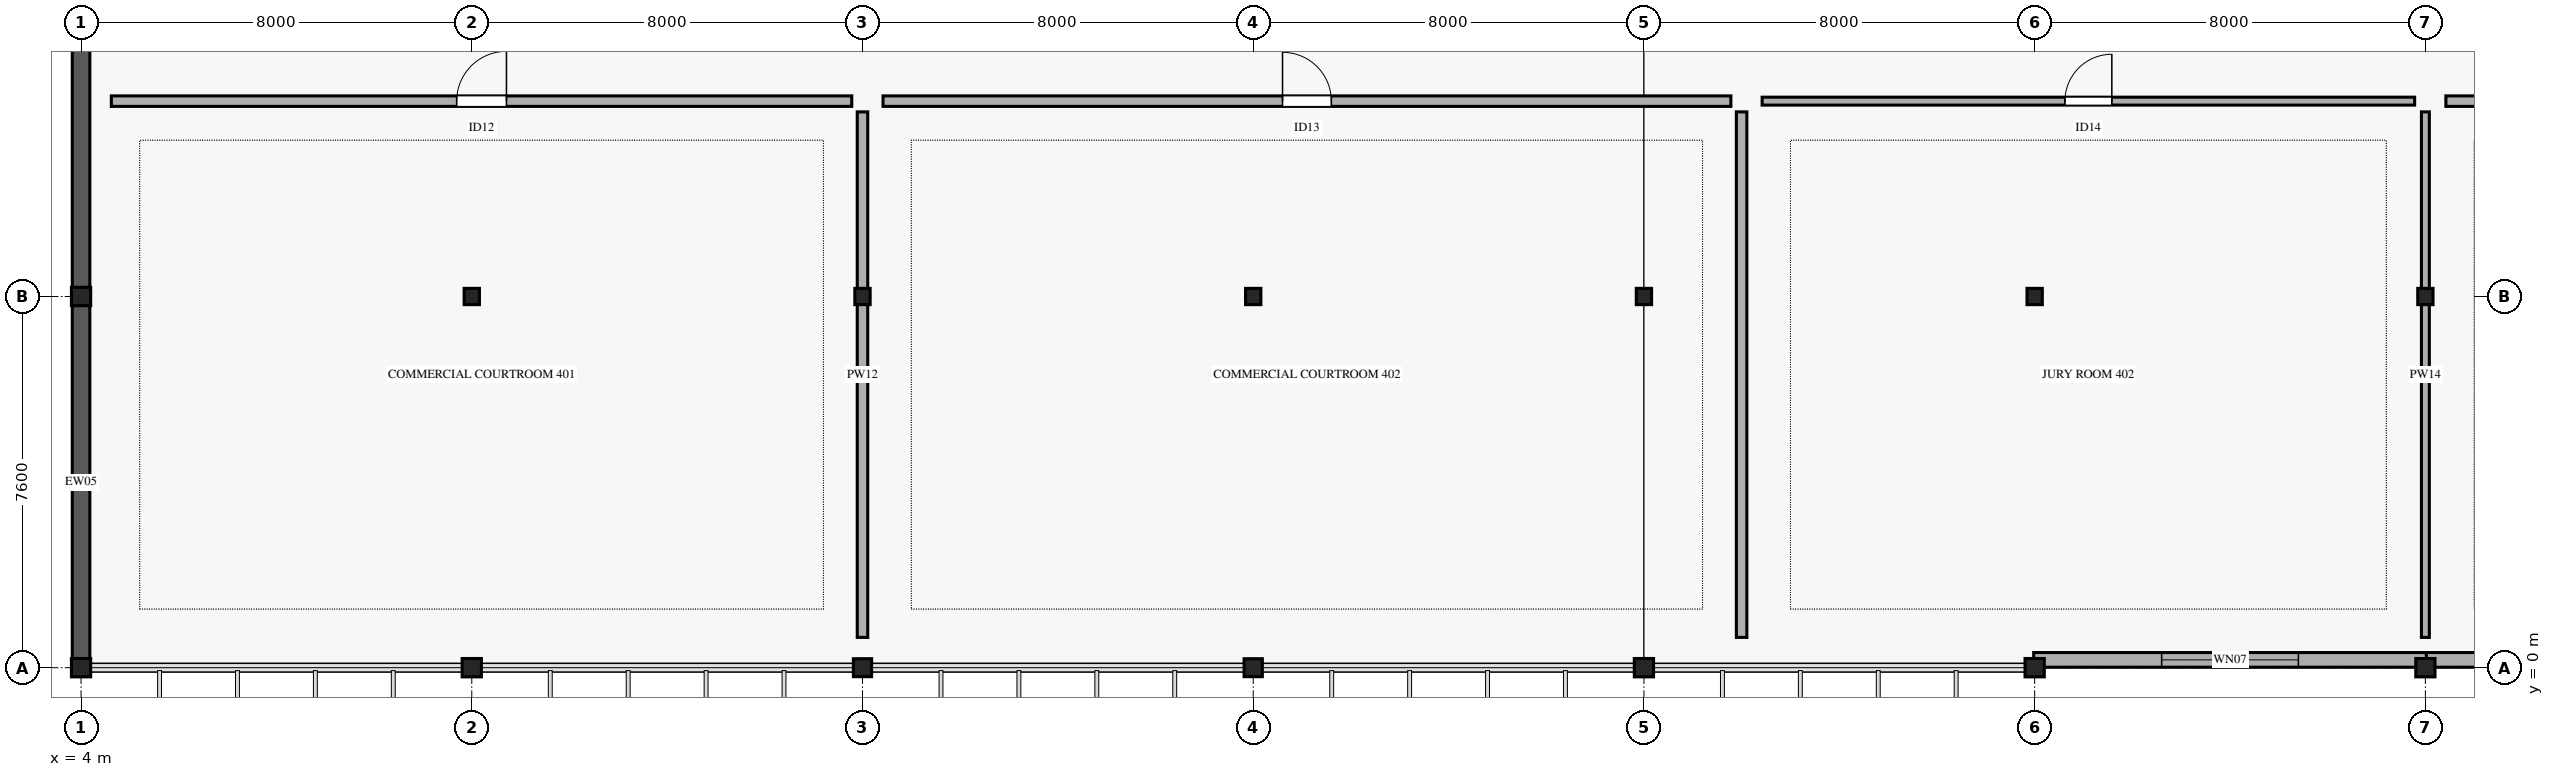
"""IFC4 building model, lengths in metres.
Left out: names, types, materials, properties, quantities, classifications, styles, units other than length and angle.
Written with IfcOpenShell. Run it as: python <this file> out.ifc"""

import sys

from ifc_helpers import new_model, si_unit, direction, frame, frame_2d, origin, origin_2d, place, context, subcontext, project, spatial, rectangle, i_section, extrude, element, fill, save


model = new_model("IFC4")
c1 = context("Model", 3, precision=1e-05, world=origin(), true_north=direction((0.0, 1.0)))
c2 = subcontext(c1, "Body", "Model", "MODEL_VIEW")
j1 = project(units=[si_unit("LENGTHUNIT", "METRE"), si_unit("PLANEANGLEUNIT", "RADIAN")], contexts=[c1])
p1 = place(None, origin())
s1 = spatial("IfcSite", under=j1, at=p1, CompositionType="ELEMENT")
p2 = place(p1, origin())
s2 = spatial("IfcBuilding", under=s1, at=p2, CompositionType="ELEMENT")
p3 = place(p2, frame((0.0, 0.0, 20.4)))
s3 = spatial("IfcBuildingStorey", under=s2, at=p3, CompositionType="ELEMENT", Elevation=20.4)
for number, where, z_axis, x_axis in (
    (1, (4.0, 0.0, 0.0), (0.0, 0.0, 1.0), (1.0, 0.0, 0.0)),
    (2, (4.0, 7.6, 0.0), (0.0, 0.0, 1.0), (1.0, 0.0, 0.0)),
    (3, (12.0, 0.0, 0.0), (0.0, 0.0, 1.0), (1.0, 0.0, 0.0)),
):
    element("IfcColumn", number, at=place(p3, frame(where, z_axis=z_axis, x_axis=x_axis)), inside=s3, PredefinedType="COLUMN", context=c2, shape_type="SweptSolid", body=[
        extrude(i_section(OverallWidth=0.394, OverallDepth=0.376, WebThickness=0.017, FlangeThickness=0.028, FilletRadius=0.015, at=origin_2d()), origin(), (0.0, 0.0, 1.0), 4.595),
    ])
p4 = place(p3, frame((12.0, 7.6, 0.0), z_axis=(0.0, 0.0, 1.0), x_axis=(1.0, 0.0, 0.0)))
e4 = element("IfcColumn", 4, at=p4, inside=s3, PredefinedType="COLUMN", context=c2, shape_type="SweptSolid", body=[
    extrude(i_section(OverallWidth=0.313, OverallDepth=0.333, WebThickness=0.018, FlangeThickness=0.028, FilletRadius=0.015, at=origin_2d()), origin(), (0.0, 0.0, 1.0), 4.595),
])
p5 = place(p3, frame((20.0, 0.0, 0.0), z_axis=(0.0, 0.0, 1.0), x_axis=(1.0, 0.0, 0.0)))
e5 = element("IfcColumn", 5, at=p5, inside=s3, PredefinedType="COLUMN", context=c2, shape_type="SweptSolid", body=[
    extrude(i_section(OverallWidth=0.373, OverallDepth=0.368, WebThickness=0.015, FlangeThickness=0.024, FilletRadius=0.015, at=origin_2d()), origin(), (0.0, 0.0, 1.0), 4.595),
])
p6 = place(p3, frame((20.0, 7.6, 0.0), z_axis=(0.0, 0.0, 1.0), x_axis=(1.0, 0.0, 0.0)))
e6 = element("IfcColumn", 6, at=p6, inside=s3, PredefinedType="COLUMN", context=c2, shape_type="SweptSolid", body=[
    extrude(i_section(OverallWidth=0.313, OverallDepth=0.333, WebThickness=0.018, FlangeThickness=0.028, FilletRadius=0.015, at=origin_2d()), origin(), (0.0, 0.0, 1.0), 4.595),
])
p7 = place(p3, frame((28.0, 0.0, 0.0), z_axis=(0.0, 0.0, 1.0), x_axis=(1.0, 0.0, 0.0)))
e7 = element("IfcColumn", 7, at=p7, inside=s3, PredefinedType="COLUMN", context=c2, shape_type="SweptSolid", body=[
    extrude(i_section(OverallWidth=0.373, OverallDepth=0.368, WebThickness=0.015, FlangeThickness=0.024, FilletRadius=0.015, at=origin_2d()), origin(), (0.0, 0.0, 1.0), 4.595),
])
p8 = place(p3, frame((28.0, 7.6, 0.0), z_axis=(0.0, 0.0, 1.0), x_axis=(1.0, 0.0, 0.0)))
e8 = element("IfcColumn", 8, at=p8, inside=s3, PredefinedType="COLUMN", context=c2, shape_type="SweptSolid", body=[
    extrude(i_section(OverallWidth=0.313, OverallDepth=0.333, WebThickness=0.018, FlangeThickness=0.028, FilletRadius=0.015, at=origin_2d()), origin(), (0.0, 0.0, 1.0), 4.595),
])
p9 = place(p3, frame((36.0, 0.0, 0.0), z_axis=(0.0, 0.0, 1.0), x_axis=(1.0, 0.0, 0.0)))
e9 = element("IfcColumn", 9, at=p9, inside=s3, PredefinedType="COLUMN", context=c2, shape_type="SweptSolid", body=[
    extrude(i_section(OverallWidth=0.394, OverallDepth=0.376, WebThickness=0.017, FlangeThickness=0.028, FilletRadius=0.015, at=origin_2d()), origin(), (0.0, 0.0, 1.0), 4.595),
])
p10 = place(p3, frame((36.0, 7.6, 0.0), z_axis=(0.0, 0.0, 1.0), x_axis=(1.0, 0.0, 0.0)))
e10 = element("IfcColumn", 10, at=p10, inside=s3, PredefinedType="COLUMN", context=c2, shape_type="SweptSolid", body=[
    extrude(i_section(OverallWidth=0.313, OverallDepth=0.333, WebThickness=0.018, FlangeThickness=0.028, FilletRadius=0.015, at=origin_2d()), origin(), (0.0, 0.0, 1.0), 4.595),
])
p11 = place(p3, frame((44.0, 0.0, 0.0), z_axis=(0.0, 0.0, 1.0), x_axis=(1.0, 0.0, 0.0)))
e11 = element("IfcColumn", 11, at=p11, inside=s3, PredefinedType="COLUMN", context=c2, shape_type="SweptSolid", body=[
    extrude(i_section(OverallWidth=0.394, OverallDepth=0.376, WebThickness=0.017, FlangeThickness=0.028, FilletRadius=0.015, at=origin_2d()), origin(), (0.0, 0.0, 1.0), 4.595),
])
p12 = place(p3, frame((44.0, 7.6, 0.0), z_axis=(0.0, 0.0, 1.0), x_axis=(1.0, 0.0, 0.0)))
e12 = element("IfcColumn", 12, at=p12, inside=s3, PredefinedType="COLUMN", context=c2, shape_type="SweptSolid", body=[
    extrude(i_section(OverallWidth=0.313, OverallDepth=0.333, WebThickness=0.018, FlangeThickness=0.028, FilletRadius=0.015, at=origin_2d()), origin(), (0.0, 0.0, 1.0), 4.595),
])
p13 = place(p3, frame((52.0, 0.0, 0.0), z_axis=(0.0, 0.0, 1.0), x_axis=(1.0, 0.0, 0.0)))
e13 = element("IfcColumn", 13, at=p13, inside=s3, PredefinedType="COLUMN", context=c2, shape_type="SweptSolid", body=[
    extrude(i_section(OverallWidth=0.394, OverallDepth=0.376, WebThickness=0.017, FlangeThickness=0.028, FilletRadius=0.015, at=origin_2d()), origin(), (0.0, 0.0, 1.0), 4.595),
])
p14 = place(p3, frame((52.0, 7.6, 0.0), z_axis=(0.0, 0.0, 1.0), x_axis=(1.0, 0.0, 0.0)))
e14 = element("IfcColumn", 14, at=p14, inside=s3, PredefinedType="COLUMN", context=c2, shape_type="SweptSolid", body=[
    extrude(i_section(OverallWidth=0.313, OverallDepth=0.333, WebThickness=0.018, FlangeThickness=0.028, FilletRadius=0.015, at=origin_2d()), origin(), (0.0, 0.0, 1.0), 4.595),
])
p15 = place(p3, frame((4.0, -0.02, 0.0), z_axis=(0.0, 0.0, 1.0), x_axis=(0.0, 1.0, 0.0)))
e15 = element("IfcWall", 15, at=p15, inside=s3, PredefinedType="STANDARD", context=c2, shape_type="SweptSolid", body=[
    extrude(rectangle(XDim=7.64, YDim=0.36, at=frame_2d((3.82, 0.0))), origin(), (0.0, 0.0, 1.0), 4.6),
])
p16 = place(p3, frame((4.0, 7.58, 0.0), z_axis=(0.0, 0.0, 1.0), x_axis=(0.0, 1.0, 0.0)))
e16 = element("IfcWall", 16, at=p16, inside=s3, PredefinedType="STANDARD", context=c2, shape_type="SweptSolid", body=[
    extrude(rectangle(XDim=7.64, YDim=0.36, at=frame_2d((3.82, 0.0))), origin(), (0.0, 0.0, 1.0), 4.6),
])
p17 = place(p3, frame((60.02, 0.16, 0.0), z_axis=(0.0, 0.0, 1.0), x_axis=(-1.0, 0.0, 0.0)))
e17 = element("IfcWall", 17, at=p17, inside=s3, PredefinedType="STANDARD", context=c2, shape_type="SweptSolid", body=[
    extrude(rectangle(XDim=8.04, YDim=0.3, at=frame_2d((4.02, 0.0))), origin(), (0.0, 0.0, 1.0), 3.66),
])
p18 = place(p17, frame((1.92, 0.0, 0.45)))
e18 = element("IfcOpeningElement", 18, at=p18, cuts=e17, PredefinedType="OPENING", context=c2, shape_type="SweptSolid", body=[
    extrude(rectangle(XDim=4.2, YDim=2.8, at=frame_2d((2.1, 1.4))), frame((0.0, 0.16, 0.0), z_axis=(0.0, -1.0, 0.0), x_axis=(1.0, 0.0, 0.0)), (0.0, 0.0, 1.0), 0.32),
])
p19 = place(p3, frame((52.02, 0.16, 0.0), z_axis=(0.0, 0.0, 1.0), x_axis=(-1.0, 0.0, 0.0)))
e19 = element("IfcWall", 19, at=p19, inside=s3, PredefinedType="STANDARD", context=c2, shape_type="SweptSolid", body=[
    extrude(rectangle(XDim=8.04, YDim=0.3, at=frame_2d((4.02, 0.0))), origin(), (0.0, 0.0, 1.0), 3.66),
])
p20 = place(p19, frame((2.62, 0.0, 0.75)))
e20 = element("IfcOpeningElement", 20, at=p20, cuts=e19, PredefinedType="OPENING", context=c2, shape_type="SweptSolid", body=[
    extrude(rectangle(XDim=2.8, YDim=2.0, at=frame_2d((1.4, 1.0))), frame((0.0, 0.16, 0.0), z_axis=(0.0, -1.0, 0.0), x_axis=(1.0, 0.0, 0.0)), (0.0, 0.0, 1.0), 0.32),
])
p21 = place(p3, frame((4.62, 11.6, 0.0), z_axis=(0.0, 0.0, 1.0), x_axis=(1.0, 0.0, 0.0)))
e21 = element("IfcWall", 21, at=p21, inside=s3, PredefinedType="PARTITIONING", context=c2, shape_type="SweptSolid", body=[
    extrude(rectangle(XDim=15.16, YDim=0.215, at=frame_2d((7.58, 0.0))), origin(), (0.0, 0.0, 1.0), 3.45),
])
p22 = place(p21, frame((7.07, 0.0, 0.0)))
e22 = element("IfcOpeningElement", 22, at=p22, cuts=e21, PredefinedType="OPENING", context=c2, shape_type="SweptSolid", body=[
    extrude(rectangle(XDim=1.02, YDim=2.25, at=frame_2d((0.51, 1.125))), frame((0.0, 0.117, 0.0), z_axis=(0.0, -1.0, 0.0), x_axis=(1.0, 0.0, 0.0)), (0.0, 0.0, 1.0), 0.235),
])
p23 = place(p3, frame((20.0, 0.62, 0.0), z_axis=(0.0, 0.0, 1.0), x_axis=(0.0, 1.0, 0.0)))
e23 = element("IfcWall", 23, at=p23, inside=s3, PredefinedType="PARTITIONING", context=c2, shape_type="SweptSolid", body=[
    extrude(rectangle(XDim=10.76, YDim=0.215, at=frame_2d((5.38, 0.0))), origin(), (0.0, 0.0, 1.0), 3.45),
])
p24 = place(p3, frame((20.42, 11.6, 0.0), z_axis=(0.0, 0.0, 1.0), x_axis=(1.0, 0.0, 0.0)))
e24 = element("IfcWall", 24, at=p24, inside=s3, PredefinedType="PARTITIONING", context=c2, shape_type="SweptSolid", body=[
    extrude(rectangle(XDim=17.36, YDim=0.215, at=frame_2d((8.68, 0.0))), origin(), (0.0, 0.0, 1.0), 3.45),
])
p25 = place(p24, frame((8.18, 0.0, 0.0)))
e25 = element("IfcOpeningElement", 25, at=p25, cuts=e24, PredefinedType="OPENING", context=c2, shape_type="SweptSolid", body=[
    extrude(rectangle(XDim=1.0, YDim=2.3, at=frame_2d((0.5, 1.15))), frame((0.0, 0.117, 0.0), z_axis=(0.0, -1.0, 0.0), x_axis=(1.0, 0.0, 0.0)), (0.0, 0.0, 1.0), 0.235),
])
p26 = place(p3, frame((38.0, 0.62, 0.0), z_axis=(0.0, 0.0, 1.0), x_axis=(0.0, 1.0, 0.0)))
e26 = element("IfcWall", 26, at=p26, inside=s3, PredefinedType="PARTITIONING", context=c2, shape_type="SweptSolid", body=[
    extrude(rectangle(XDim=10.76, YDim=0.215, at=frame_2d((5.38, 0.0))), origin(), (0.0, 0.0, 1.0), 3.45),
])
p27 = place(p3, frame((38.42, 11.6, 0.0), z_axis=(0.0, 0.0, 1.0), x_axis=(1.0, 0.0, 0.0)))
e27 = element("IfcWall", 27, at=p27, inside=s3, PredefinedType="PARTITIONING", context=c2, shape_type="SweptSolid", body=[
    extrude(rectangle(XDim=13.36, YDim=0.162, at=frame_2d((6.68, 0.0))), origin(), (0.0, 0.0, 1.0), 3.45),
])
p28 = place(p27, frame((6.2, 0.0, 0.0)))
e28 = element("IfcOpeningElement", 28, at=p28, cuts=e27, PredefinedType="OPENING", context=c2, shape_type="SweptSolid", body=[
    extrude(rectangle(XDim=0.96, YDim=2.25, at=frame_2d((0.48, 1.125))), frame((0.0, 0.091, 0.0), z_axis=(0.0, -1.0, 0.0), x_axis=(1.0, 0.0, 0.0)), (0.0, 0.0, 1.0), 0.182),
])
p29 = place(p3, frame((52.0, 0.62, 0.0), z_axis=(0.0, 0.0, 1.0), x_axis=(0.0, 1.0, 0.0)))
e29 = element("IfcWall", 29, at=p29, inside=s3, PredefinedType="PARTITIONING", context=c2, shape_type="SweptSolid", body=[
    extrude(rectangle(XDim=10.76, YDim=0.162, at=frame_2d((5.38, 0.0))), origin(), (0.0, 0.0, 1.0), 3.45),
])
p30 = place(p3, frame((52.42, 11.6, 0.0), z_axis=(0.0, 0.0, 1.0), x_axis=(1.0, 0.0, 0.0)))
e30 = element("IfcWall", 30, at=p30, inside=s3, PredefinedType="PARTITIONING", context=c2, shape_type="SweptSolid", body=[
    extrude(rectangle(XDim=13.36, YDim=0.215, at=frame_2d((6.68, 0.0))), origin(), (0.0, 0.0, 1.0), 3.45),
])
p31 = place(p30, frame((6.22, 0.0, 0.0)))
e31 = element("IfcOpeningElement", 31, at=p31, cuts=e30, PredefinedType="OPENING", context=c2, shape_type="SweptSolid", body=[
    extrude(rectangle(XDim=0.92, YDim=2.2, at=frame_2d((0.46, 1.1))), frame((0.0, 0.117, 0.0), z_axis=(0.0, -1.0, 0.0), x_axis=(1.0, 0.0, 0.0)), (0.0, 0.0, 1.0), 0.235),
])
p32 = place(p20, origin())
e32 = element("IfcWindow", 32, at=p32, inside=s3, PartitioningType="SINGLE_PANEL", PredefinedType="WINDOW", context=c2, shape_type="SweptSolid", body=[
    extrude(rectangle(XDim=2.8, YDim=2.0, at=frame_2d((1.4, 1.0))), frame((0.0, 0.03, 0.0), z_axis=(0.0, -1.0, 0.0), x_axis=(1.0, 0.0, 0.0)), (0.0, 0.0, 1.0), 0.06),
])
fill(e20, e32)
p33 = place(p22, origin())
e33 = element("IfcDoor", 33, at=p33, inside=s3, OperationType="SINGLE_SWING_RIGHT", PredefinedType="DOOR", context=c2, shape_type="SweptSolid", body=[
    extrude(rectangle(XDim=1.02, YDim=2.25, at=frame_2d((0.51, 1.125))), frame((0.0, 0.025, 0.0), z_axis=(0.0, -1.0, 0.0), x_axis=(1.0, 0.0, 0.0)), (0.0, 0.0, 1.0), 0.05),
])
fill(e22, e33)
p34 = place(p25, origin())
e34 = element("IfcDoor", 34, at=p34, inside=s3, OperationType="SINGLE_SWING_LEFT", PredefinedType="DOOR", context=c2, shape_type="SweptSolid", body=[
    extrude(rectangle(XDim=1.0, YDim=2.3, at=frame_2d((0.5, 1.15))), frame((0.0, 0.025, 0.0), z_axis=(0.0, -1.0, 0.0), x_axis=(1.0, 0.0, 0.0)), (0.0, 0.0, 1.0), 0.05),
])
fill(e25, e34)
p35 = place(p28, origin())
e35 = element("IfcDoor", 35, at=p35, inside=s3, OperationType="SINGLE_SWING_RIGHT", PredefinedType="DOOR", context=c2, shape_type="SweptSolid", body=[
    extrude(rectangle(XDim=0.96, YDim=2.25, at=frame_2d((0.48, 1.125))), frame((0.0, 0.025, 0.0), z_axis=(0.0, -1.0, 0.0), x_axis=(1.0, 0.0, 0.0)), (0.0, 0.0, 1.0), 0.05),
])
fill(e28, e35)
save(model, sys.argv[1])
